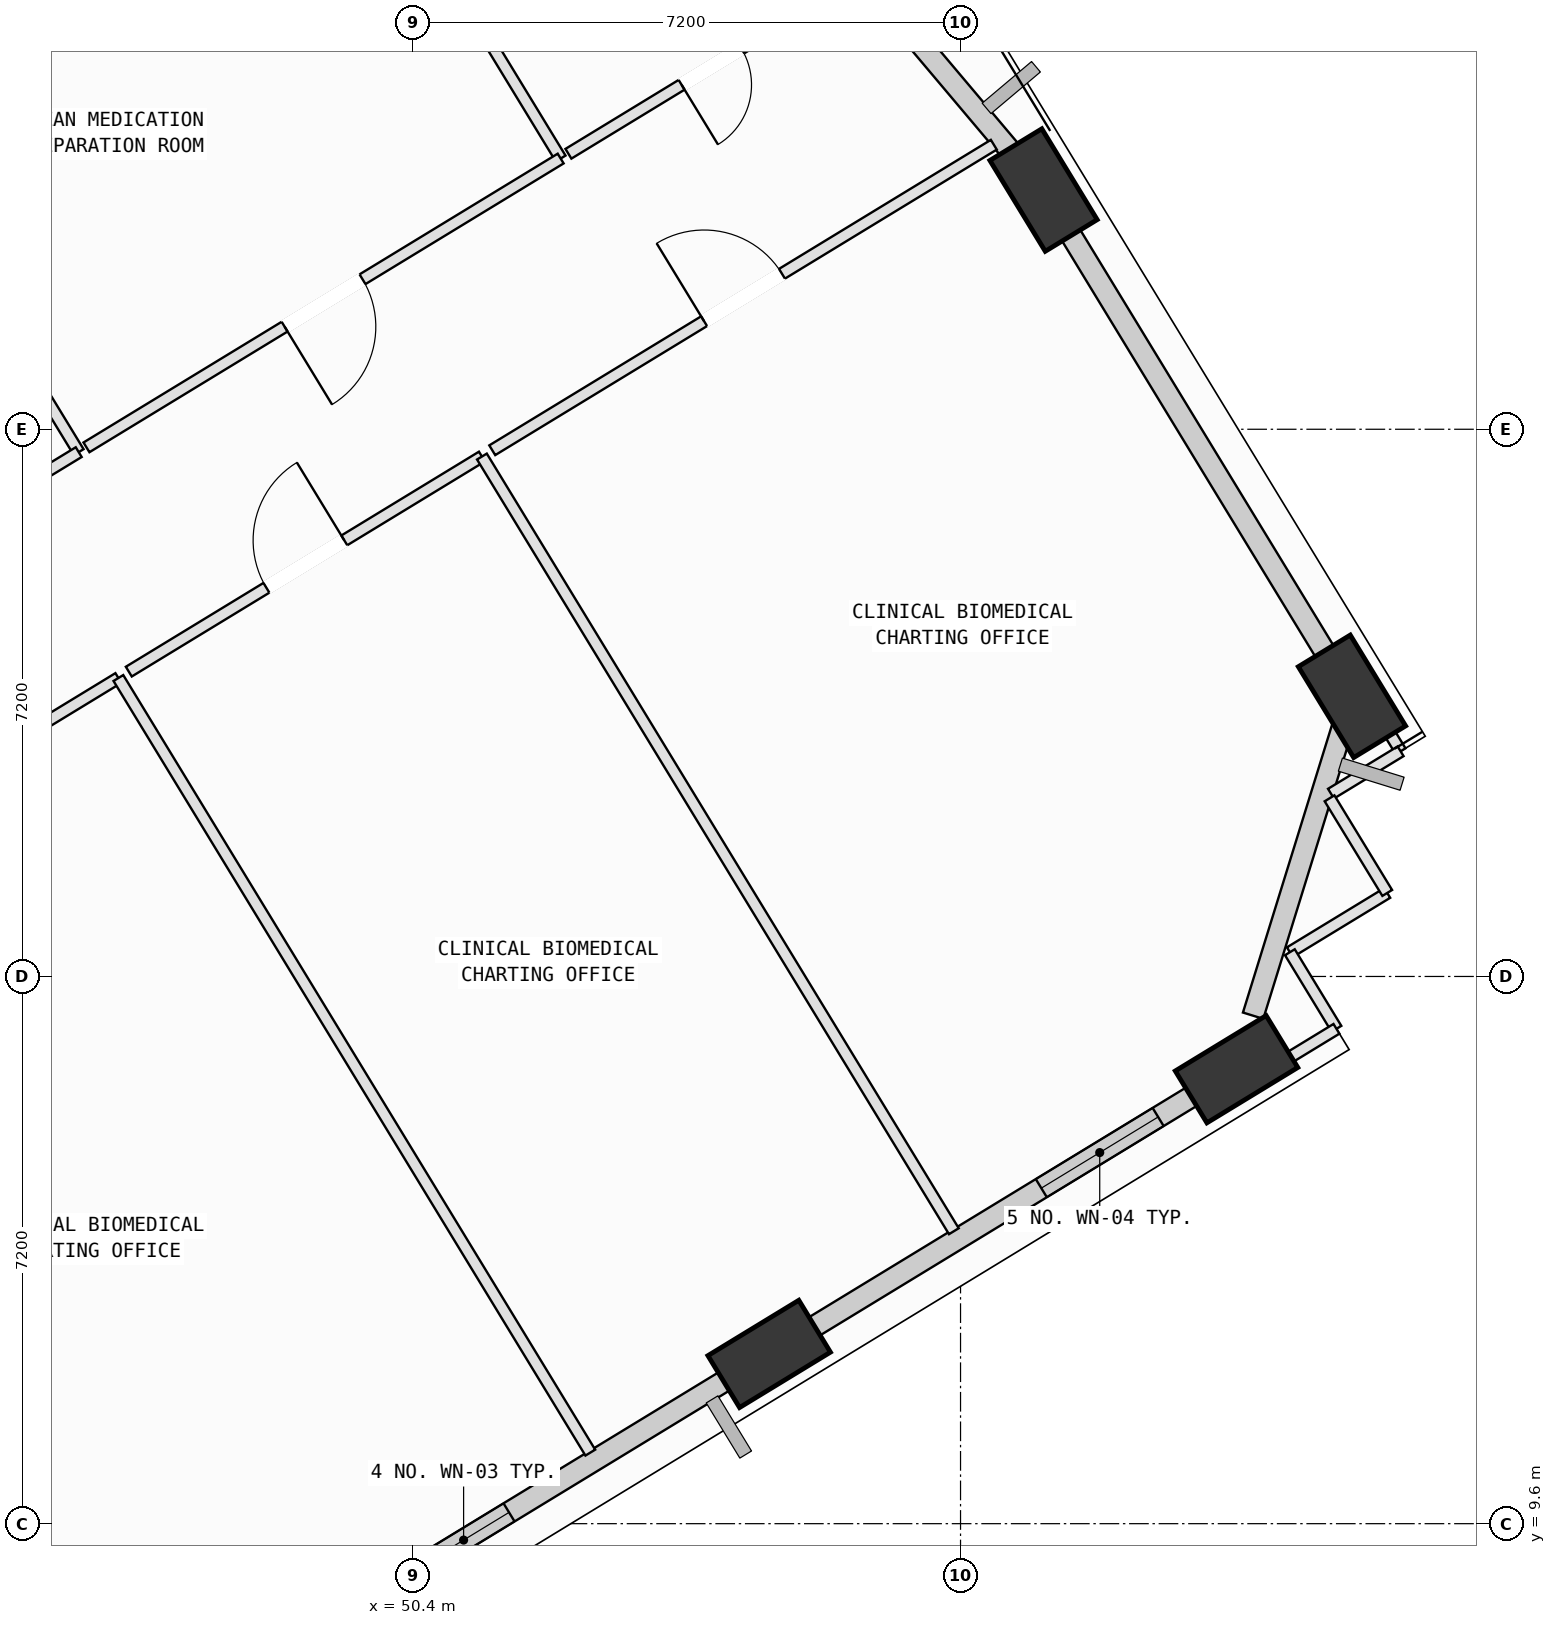
"""IFC4 building model, lengths in metres.
Left out: names, types, materials, properties, quantities, classifications, styles, units other than length and angle.
Written with IfcOpenShell. Run it as: python <this file> out.ifc"""

import sys

from ifc_helpers import new_model, si_unit, direction, frame, frame_2d, origin, origin_2d, place, context, subcontext, project, spatial, rectangle, extrude, element, fill, save


model = new_model("IFC4")
c1 = context("Model", 3, precision=1e-05, world=origin(), true_north=direction((0.0, 1.0)))
c2 = subcontext(c1, "Body", "Model", "MODEL_VIEW")
j1 = project(units=[si_unit("LENGTHUNIT", "METRE"), si_unit("PLANEANGLEUNIT", "RADIAN")], contexts=[c1])
p1 = place(None, origin())
s1 = spatial("IfcSite", under=j1, at=p1, CompositionType="ELEMENT")
p2 = place(p1, origin())
s2 = spatial("IfcBuilding", under=s1, at=p2, CompositionType="ELEMENT")
p3 = place(p2, frame((0.0, 0.0, 157.8)))
s3 = spatial("IfcBuildingStorey", under=s2, at=p3, CompositionType="ELEMENT", Elevation=157.8)
p4 = place(p3, frame((55.083, 11.833, 0.002), z_axis=(0.052681851679, 0.089018353759, 0.994635790226), x_axis=(-0.998496894363, -0.010383795381, 0.053815692324)))
e1 = element("IfcColumn", 1, at=p4, inside=s3, PredefinedType="COLUMN", context=c2, shape_type="SweptSolid", body=[
    extrude(rectangle(XDim=1.4, YDim=0.8, at=origin_2d()), origin(), (0.0, 0.0, 1.0), 4.018),
])
p5 = place(p3, frame((61.231, 15.58, 0.002), z_axis=(0.036996840593, 0.114023049697, 0.992788989627), x_axis=(-0.971725472627, -0.227727901061, 0.062366729324)))
e2 = element("IfcColumn", 2, at=p5, inside=s3, PredefinedType="COLUMN", context=c2, shape_type="SweptSolid", body=[
    extrude(rectangle(XDim=1.4, YDim=0.8, at=origin_2d()), origin(), (0.0, 0.0, 1.0), 4.025),
])
p6 = place(p3, frame((62.75, 20.486, 0.002), z_axis=(0.016736781521, 0.120068215257, 0.992624553308), x_axis=(0.398248918499, -0.911416085067, 0.103530279609)))
e3 = element("IfcColumn", 3, at=p6, inside=s3, PredefinedType="COLUMN", context=c2, shape_type="SweptSolid", body=[
    extrude(rectangle(XDim=1.4, YDim=0.8, at=origin_2d()), origin(), (0.0, 0.0, 1.0), 4.026),
])
p7 = place(p3, frame((58.692, 27.147, 0.002), z_axis=(-0.010511571788, 0.103353662496, 0.994589124869), x_axis=(0.603537659278, -0.792383162423, 0.088719883581)))
e4 = element("IfcColumn", 4, at=p7, inside=s3, PredefinedType="COLUMN", context=c2, shape_type="SweptSolid", body=[
    extrude(rectangle(XDim=1.4, YDim=0.8, at=origin_2d()), origin(), (0.0, 0.0, 1.0), 4.018),
])
p8 = place(p3, frame((54.824, 11.676, 0.0), z_axis=(0.0, 0.0, 1.0), x_axis=(-0.854030198101, -0.52022343347, 0.0)))
e5 = element("IfcWall", 5, at=p8, inside=s3, PredefinedType="SOLIDWALL", context=c2, shape_type="SweptSolid", body=[
    extrude(rectangle(XDim=6.218, YDim=0.28, at=frame_2d((3.109, 0.0))), origin(), (0.0, 0.0, 1.0), 3.165),
])
p9 = place(p8, frame((3.705, 0.0, 0.75)))
e6 = element("IfcOpeningElement", 6, at=p9, cuts=e5, PredefinedType="OPENING", context=c2, shape_type="SweptSolid", body=[
    extrude(rectangle(XDim=1.4, YDim=1.85, at=frame_2d((0.7, 0.925))), frame((0.0, 0.15, 0.0), z_axis=(0.0, -1.0, 0.0), x_axis=(1.0, 0.0, 0.0)), (0.0, 0.0, 1.0), 0.3),
])
p10 = place(p3, frame((60.986, 15.43, 0.0), z_axis=(0.0, 0.0, 1.0), x_axis=(-0.854005149622, -0.520264552337, 0.0)))
e7 = element("IfcWall", 7, at=p10, inside=s3, PredefinedType="SOLIDWALL", context=c2, shape_type="SweptSolid", body=[
    extrude(rectangle(XDim=6.242, YDim=0.28, at=frame_2d((3.121, 0.0))), origin(), (0.0, 0.0, 1.0), 3.165),
])
p11 = place(p10, frame((0.92, 0.0, 0.75)))
e8 = element("IfcOpeningElement", 8, at=p11, cuts=e7, PredefinedType="OPENING", context=c2, shape_type="SweptSolid", body=[
    extrude(rectangle(XDim=1.8, YDim=2.05, at=frame_2d((0.9, 1.025))), frame((0.0, 0.15, 0.0), z_axis=(0.0, -1.0, 0.0), x_axis=(1.0, 0.0, 0.0)), (0.0, 0.0, 1.0), 0.3),
])
p12 = place(p3, frame((62.675, 20.244, 0.0), z_axis=(0.0, 0.0, 1.0), x_axis=(-0.295765624061, -0.955260538086, 0.0)))
e9 = element("IfcWall", 9, at=p12, inside=s3, PredefinedType="SOLIDWALL", context=c2, shape_type="SweptSolid", body=[
    extrude(rectangle(XDim=4.146, YDim=0.28, at=frame_2d((2.073, 0.0))), origin(), (0.0, 0.0, 1.0), 3.165),
])
p13 = place(p3, frame((58.848, 26.892, 0.0), z_axis=(0.0, 0.0, 1.0), x_axis=(0.520252637588, -0.854012408038, 0.0)))
e10 = element("IfcWall", 10, at=p13, inside=s3, PredefinedType="SOLIDWALL", context=c2, shape_type="SweptSolid", body=[
    extrude(rectangle(XDim=6.84, YDim=0.28, at=frame_2d((3.42, 0.0))), origin(), (0.0, 0.0, 1.0), 3.165),
])
p14 = place(p3, frame((52.573, 34.404, 0.0), z_axis=(0.0, 0.0, 1.0), x_axis=(0.644659621066, -0.764469733192, 0.0)))
e11 = element("IfcWall", 11, at=p14, inside=s3, PredefinedType="SOLIDWALL", context=c2, shape_type="SweptSolid", body=[
    extrude(rectangle(XDim=8.838, YDim=0.28, at=frame_2d((4.419, 0.0))), origin(), (0.0, 0.0, 1.0), 3.165),
])
p15 = place(p3, frame((39.483, 16.44, 0.0), z_axis=(0.0, 0.0, 1.0), x_axis=(0.854001681797, 0.520270244669, 0.0)))
e12 = element("IfcWall", 12, at=p15, inside=s3, PredefinedType="PARTITIONING", context=c2, shape_type="SweptSolid", body=[
    extrude(rectangle(XDim=8.24, YDim=0.15, at=frame_2d((4.12, 0.0))), origin(), (0.0, 0.0, 1.0), 3.78),
])
p16 = place(p15, frame((3.52, 0.0, 0.0)))
e13 = element("IfcOpeningElement", 13, at=p16, cuts=e12, PredefinedType="OPENING", context=c2, shape_type="SweptSolid", body=[
    extrude(rectangle(XDim=1.2, YDim=2.15, at=frame_2d((0.6, 1.075))), frame((0.0, 0.085, 0.0), z_axis=(0.0, -1.0, 0.0), x_axis=(1.0, 0.0, 0.0)), (0.0, 0.0, 1.0), 0.17),
])
p17 = place(p3, frame((46.52, 20.727, 0.0), z_axis=(0.0, 0.0, 1.0), x_axis=(0.520257122218, -0.854009676047, 0.0)))
e14 = element("IfcWall", 14, at=p17, inside=s3, PredefinedType="PARTITIONING", context=c2, shape_type="SweptSolid", body=[
    extrude(rectangle(XDim=11.935, YDim=0.15, at=frame_2d((5.967, 0.0))), origin(), (0.0, 0.0, 1.0), 3.415),
])
p18 = place(p3, frame((46.657, 20.811, 0.0), z_axis=(0.0, 0.0, 1.0), x_axis=(0.85402865448, 0.520225967563, 0.0)))
e15 = element("IfcWall", 15, at=p18, inside=s3, PredefinedType="PARTITIONING", context=c2, shape_type="SweptSolid", body=[
    extrude(rectangle(XDim=5.44, YDim=0.15, at=frame_2d((2.72, 0.0))), origin(), (0.0, 0.0, 1.0), 3.065),
])
p19 = place(p18, frame((2.12, 0.0, 0.0)))
e16 = element("IfcOpeningElement", 16, at=p19, cuts=e15, PredefinedType="OPENING", context=c2, shape_type="SweptSolid", body=[
    extrude(rectangle(XDim=1.2, YDim=2.15, at=frame_2d((0.6, 1.075))), frame((0.0, 0.085, 0.0), z_axis=(0.0, -1.0, 0.0), x_axis=(1.0, 0.0, 0.0)), (0.0, 0.0, 1.0), 0.17),
])
p20 = place(p3, frame((51.303, 23.641, 0.0), z_axis=(0.0, 0.0, 1.0), x_axis=(0.520220768099, -0.854031821678, 0.0)))
e17 = element("IfcWall", 17, at=p20, inside=s3, PredefinedType="PARTITIONING", context=c2, shape_type="SweptSolid", body=[
    extrude(rectangle(XDim=11.935, YDim=0.15, at=frame_2d((5.968, 0.0))), origin(), (0.0, 0.0, 1.0), 3.78),
])
p21 = place(p3, frame((55.774, 11.986, 0.0), z_axis=(0.0, 0.0, 1.0), x_axis=(-0.853573113666, -0.520973069963, 0.0)))
e18 = element("IfcWall", 18, at=p21, inside=s3, PredefinedType="PARTITIONING", context=c2, shape_type="SweptSolid", body=[
    extrude(rectangle(XDim=0.973, YDim=0.15, at=frame_2d((0.487, 0.0))), origin(), (0.0, 0.0, 1.0), 3.165),
])
p22 = place(p3, frame((63.214, 17.899, 0.0), z_axis=(0.0, 0.0, 1.0), x_axis=(-0.854113673414, -0.520086370604, 0.0)))
e19 = element("IfcWall", 19, at=p22, inside=s3, PredefinedType="PARTITIONING", context=c2, shape_type="SweptSolid", body=[
    extrude(rectangle(XDim=1.5, YDim=0.15, at=frame_2d((0.75, 0.0))), origin(), (0.0, 0.0, 1.0), 3.78),
])
p23 = place(p3, frame((61.933, 17.119, 0.0), z_axis=(0.0, 0.0, 1.0), x_axis=(0.519539763947, -0.854446273137, 0.0)))
e20 = element("IfcWall", 20, at=p23, inside=s3, PredefinedType="PARTITIONING", context=c2, shape_type="SweptSolid", body=[
    extrude(rectangle(XDim=1.179, YDim=0.15, at=frame_2d((0.59, 0.0))), origin(), (0.0, 0.0, 1.0), 3.78),
])
p24 = place(p3, frame((62.546, 16.111, 0.0), z_axis=(0.0, 0.0, 1.0), x_axis=(-0.853910658125, -0.520419626783, 0.0)))
e21 = element("IfcWall", 21, at=p24, inside=s3, PredefinedType="PARTITIONING", context=c2, shape_type="SweptSolid", body=[
    extrude(rectangle(XDim=1.688, YDim=0.15, at=frame_2d((0.844, 0.0))), origin(), (0.0, 0.0, 1.0), 3.78),
])
p25 = place(p3, frame((51.439, 23.724, 0.0), z_axis=(0.0, 0.0, 1.0), x_axis=(0.854030727283, 0.520222564732, 0.0)))
e22 = element("IfcWall", 22, at=p25, inside=s3, PredefinedType="PARTITIONING", context=c2, shape_type="SweptSolid", body=[
    extrude(rectangle(XDim=7.727, YDim=0.15, at=frame_2d((3.864, 0.0))), origin(), (0.0, 0.0, 1.0), 3.065),
])
p26 = place(p25, frame((3.263, 0.0, 0.0)))
e23 = element("IfcOpeningElement", 23, at=p26, cuts=e22, PredefinedType="OPENING", context=c2, shape_type="SweptSolid", body=[
    extrude(rectangle(XDim=1.2, YDim=2.15, at=frame_2d((0.6, 1.075))), frame((0.0, 0.085, 0.0), z_axis=(0.0, -1.0, 0.0), x_axis=(1.0, 0.0, 0.0)), (0.0, 0.0, 1.0), 0.17),
])
p27 = place(p3, frame((58.479, 27.824, 0.0), z_axis=(0.0, 0.0, 1.0), x_axis=(0.520080187423, -0.854117438442, 0.0)))
e24 = element("IfcWall", 24, at=p27, inside=s3, PredefinedType="PARTITIONING", context=c2, shape_type="SweptSolid", body=[
    extrude(rectangle(XDim=0.988, YDim=0.15, at=frame_2d((0.494, 0.0))), origin(), (0.0, 0.0, 1.0), 3.165),
])
p28 = place(p3, frame((62.552, 21.139, 0.0), z_axis=(0.0, 0.0, 1.0), x_axis=(0.520100782276, -0.8541048977, 0.0)))
e25 = element("IfcWall", 25, at=p28, inside=s3, PredefinedType="PARTITIONING", context=c2, shape_type="SweptSolid", body=[
    extrude(rectangle(XDim=1.611, YDim=0.15, at=frame_2d((0.806, 0.0))), origin(), (0.0, 0.0, 1.0), 3.165),
])
p29 = place(p3, frame((63.39, 19.763, 0.0), z_axis=(0.0, 0.0, 1.0), x_axis=(-0.854018246521, -0.520243053399, 0.0)))
e26 = element("IfcWall", 26, at=p29, inside=s3, PredefinedType="PARTITIONING", context=c2, shape_type="SweptSolid", body=[
    extrude(rectangle(XDim=1.072, YDim=0.15, at=frame_2d((0.536, 0.0))), origin(), (0.0, 0.0, 1.0), 3.78),
])
p30 = place(p3, frame((62.455, 19.144, 0.0), z_axis=(0.0, 0.0, 1.0), x_axis=(0.520515143071, -0.853852437974, 0.0)))
e27 = element("IfcWall", 27, at=p30, inside=s3, PredefinedType="PARTITIONING", context=c2, shape_type="SweptSolid", body=[
    extrude(rectangle(XDim=1.458, YDim=0.15, at=frame_2d((0.729, 0.0))), origin(), (0.0, 0.0, 1.0), 3.78),
])
p31 = place(p3, frame((43.94, 27.077, 0.0), z_axis=(0.0, 0.0, 1.0), x_axis=(0.52031109825, -0.853976791861, 0.0)))
e28 = element("IfcWall", 28, at=p31, inside=s3, PredefinedType="PARTITIONING", context=c2, shape_type="SweptSolid", body=[
    extrude(rectangle(XDim=3.956, YDim=0.15, at=frame_2d((1.978, 0.0))), origin(), (0.0, 0.0, 1.0), 3.415),
])
p32 = place(p3, frame((45.998, 23.699, 0.0), z_axis=(0.0, 0.0, 1.0), x_axis=(-0.854066940543, -0.520163110065, 0.0)))
e29 = element("IfcWall", 29, at=p32, inside=s3, PredefinedType="PARTITIONING", context=c2, shape_type="SweptSolid", body=[
    extrude(rectangle(XDim=5.804, YDim=0.15, at=frame_2d((2.902, 0.0))), origin(), (0.0, 0.0, 1.0), 3.78),
])
p33 = place(p3, frame((49.256, 32.622, 0.0), z_axis=(0.0, 0.0, 1.0), x_axis=(0.520312896465, -0.853975696242, 0.0)))
e30 = element("IfcWall", 30, at=p33, inside=s3, PredefinedType="PARTITIONING", context=c2, shape_type="SweptSolid", body=[
    extrude(rectangle(XDim=5.925, YDim=0.15, at=frame_2d((2.963, 0.0))), origin(), (0.0, 0.0, 1.0), 3.78),
])
p34 = place(p3, frame((52.339, 27.562, 0.0), z_axis=(0.0, 0.0, 1.0), x_axis=(-0.85405331728, -0.520185477733, 0.0)))
e31 = element("IfcWall", 31, at=p34, inside=s3, PredefinedType="PARTITIONING", context=c2, shape_type="SweptSolid", body=[
    extrude(rectangle(XDim=7.305, YDim=0.15, at=frame_2d((3.653, 0.0))), origin(), (0.0, 0.0, 1.0), 3.78),
])
p35 = place(p34, frame((3.052, 0.0, 0.0)))
e32 = element("IfcOpeningElement", 32, at=p35, cuts=e31, PredefinedType="OPENING", context=c2, shape_type="SweptSolid", body=[
    extrude(rectangle(XDim=1.2, YDim=2.15, at=frame_2d((0.6, 1.075))), frame((0.0, 0.085, 0.0), z_axis=(0.0, -1.0, 0.0), x_axis=(1.0, 0.0, 0.0)), (0.0, 0.0, 1.0), 0.17),
])
p36 = place(p3, frame((56.205, 29.918, 0.0), z_axis=(0.0, 0.0, 1.0), x_axis=(-0.854023088478, -0.520235104877, 0.0)))
e33 = element("IfcWall", 33, at=p36, inside=s3, PredefinedType="PARTITIONING", context=c2, shape_type="SweptSolid", body=[
    extrude(rectangle(XDim=4.407, YDim=0.15, at=frame_2d((2.204, 0.0))), origin(), (0.0, 0.0, 1.0), 3.78),
])
p37 = place(p36, frame((1.744, 0.0, 0.0)))
e34 = element("IfcOpeningElement", 34, at=p37, cuts=e33, PredefinedType="OPENING", context=c2, shape_type="SweptSolid", body=[
    extrude(rectangle(XDim=0.92, YDim=2.1, at=frame_2d((0.46, 1.05))), frame((0.0, 0.085, 0.0), z_axis=(0.0, -1.0, 0.0), x_axis=(1.0, 0.0, 0.0)), (0.0, 0.0, 1.0), 0.17),
])
p38 = place(p9, origin())
e35 = element("IfcWindow", 35, at=p38, inside=s3, PartitioningType="SINGLE_PANEL", PredefinedType="WINDOW", context=c2, shape_type="SweptSolid", body=[
    extrude(rectangle(XDim=1.4, YDim=1.85, at=frame_2d((0.7, 0.925))), frame((0.0, 0.03, 0.0), z_axis=(0.0, -1.0, 0.0), x_axis=(1.0, 0.0, 0.0)), (0.0, 0.0, 1.0), 0.06),
])
fill(e6, e35)
p39 = place(p11, origin())
e36 = element("IfcWindow", 36, at=p39, inside=s3, PartitioningType="SINGLE_PANEL", PredefinedType="WINDOW", context=c2, shape_type="SweptSolid", body=[
    extrude(rectangle(XDim=1.8, YDim=2.05, at=frame_2d((0.9, 1.025))), frame((0.0, 0.03, 0.0), z_axis=(0.0, -1.0, 0.0), x_axis=(1.0, 0.0, 0.0)), (0.0, 0.0, 1.0), 0.06),
])
fill(e8, e36)
p40 = place(p19, origin())
e37 = element("IfcDoor", 37, at=p40, inside=s3, OperationType="SINGLE_SWING_RIGHT", PredefinedType="DOOR", context=c2, shape_type="SweptSolid", body=[
    extrude(rectangle(XDim=1.2, YDim=2.15, at=frame_2d((0.6, 1.075))), frame((0.0, 0.025, 0.0), z_axis=(0.0, -1.0, 0.0), x_axis=(1.0, 0.0, 0.0)), (0.0, 0.0, 1.0), 0.05),
])
fill(e16, e37)
p41 = place(p26, origin())
e38 = element("IfcDoor", 38, at=p41, inside=s3, OperationType="SINGLE_SWING_LEFT", PredefinedType="DOOR", context=c2, shape_type="SweptSolid", body=[
    extrude(rectangle(XDim=1.2, YDim=2.15, at=frame_2d((0.6, 1.075))), frame((0.0, 0.025, 0.0), z_axis=(0.0, -1.0, 0.0), x_axis=(1.0, 0.0, 0.0)), (0.0, 0.0, 1.0), 0.05),
])
fill(e23, e38)
p42 = place(p35, origin())
e39 = element("IfcDoor", 39, at=p42, inside=s3, OperationType="SINGLE_SWING_RIGHT", PredefinedType="DOOR", context=c2, shape_type="SweptSolid", body=[
    extrude(rectangle(XDim=1.2, YDim=2.15, at=frame_2d((0.6, 1.075))), frame((0.0, 0.025, 0.0), z_axis=(0.0, -1.0, 0.0), x_axis=(1.0, 0.0, 0.0)), (0.0, 0.0, 1.0), 0.05),
])
fill(e32, e39)
p43 = place(p37, origin())
e40 = element("IfcDoor", 40, at=p43, inside=s3, OperationType="SINGLE_SWING_RIGHT", PredefinedType="DOOR", context=c2, shape_type="SweptSolid", body=[
    extrude(rectangle(XDim=0.92, YDim=2.1, at=frame_2d((0.46, 1.05))), frame((0.0, 0.025, 0.0), z_axis=(0.0, -1.0, 0.0), x_axis=(1.0, 0.0, 0.0)), (0.0, 0.0, 1.0), 0.05),
])
fill(e34, e40)
save(model, sys.argv[1])
